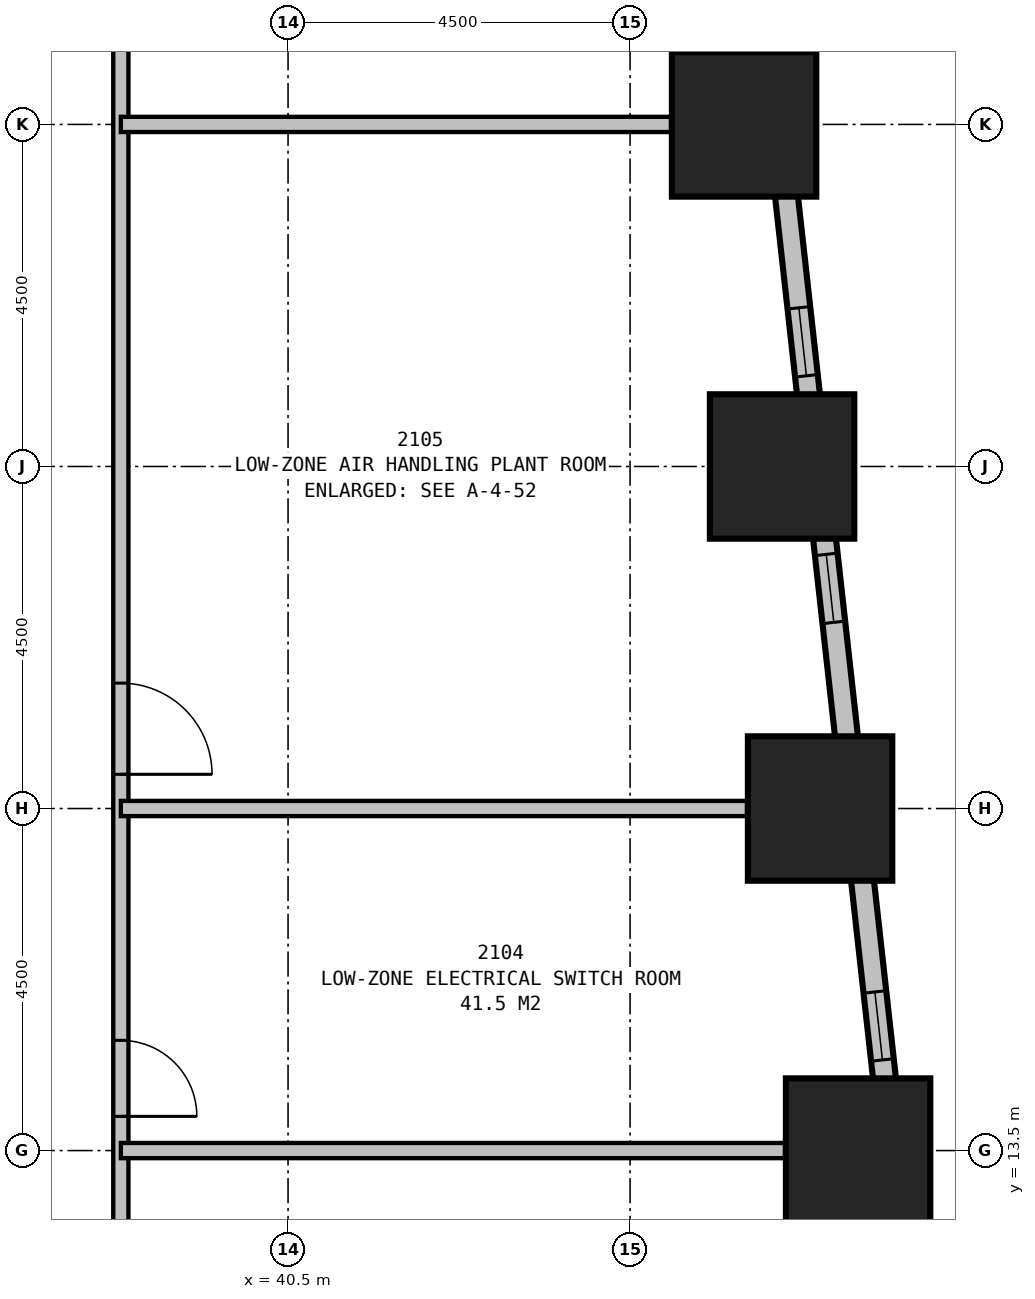
"""IFC4 building model, lengths in metres.
Left out: names, types, materials, properties, quantities, classifications, styles, units other than length and angle.
Written with IfcOpenShell. Run it as: python <this file> out.ifc"""

import sys

from ifc_helpers import new_model, si_unit, direction, frame, frame_2d, origin, origin_2d, place, context, subcontext, project, spatial, rectangle, extrude, element, fill, save


model = new_model("IFC4")
c1 = context("Model", 3, precision=1e-05, world=origin(), true_north=direction((0.0, 1.0)))
c2 = subcontext(c1, "Body", "Model", "MODEL_VIEW")
j1 = project(units=[si_unit("LENGTHUNIT", "METRE"), si_unit("PLANEANGLEUNIT", "RADIAN")], contexts=[c1])
p1 = place(None, origin())
s1 = spatial("IfcSite", under=j1, at=p1, CompositionType="ELEMENT")
p2 = place(p1, origin())
s2 = spatial("IfcBuilding", under=s1, at=p2, CompositionType="ELEMENT")
p3 = place(p2, frame((0.0, 0.0, 85.7)))
s3 = spatial("IfcBuildingStorey", under=s2, at=p3, CompositionType="ELEMENT", Elevation=85.7)
for number, where, z_axis, x_axis in (
    (1, (48.0, 13.5, 0.0), (0.0, 0.0, 1.0), (1.0, 0.0, 0.0)),
    (2, (47.5, 18.0, 0.0), (0.0, 0.0, 1.0), (1.0, 0.0, 0.0)),
    (3, (47.0, 22.5, 0.0), (0.0, 0.0, 1.0), (1.0, 0.0, 0.0)),
    (4, (46.5, 27.0, 0.0), (0.0, 0.0, 1.0), (1.0, 0.0, 0.0)),
):
    element("IfcColumn", number, at=place(p3, frame(where, z_axis=z_axis, x_axis=x_axis)), inside=s3, PredefinedType="COLUMN", context=c2, shape_type="SweptSolid", body=[
        extrude(rectangle(XDim=1.9, YDim=1.9, at=origin_2d()), origin(), (0.0, 0.0, 1.0), 4.2),
    ])
p4 = place(p3, frame((49.519, 3.901, 0.0), z_axis=(0.0, 0.0, 1.0), x_axis=(-0.110429082637, 0.993884006164, 0.0)))
e5 = element("IfcWall", 5, at=p4, inside=s3, PredefinedType="STANDARD", context=c2, shape_type="SweptSolid", body=[
    extrude(rectangle(XDim=32.899, YDim=0.3, at=frame_2d((16.45, 0.0))), origin(), (0.0, 0.0, 1.0), 2.85),
])
p5 = place(p4, frame((1.803, 0.0, 0.5)))
e6 = element("IfcOpeningElement", 6, at=p5, cuts=e5, PredefinedType="OPENING", context=c2, shape_type="SweptSolid", body=[
    extrude(rectangle(XDim=0.9, YDim=1.2, at=frame_2d((0.45, 0.6))), frame((0.0, 0.16, 0.0), z_axis=(0.0, -1.0, 0.0), x_axis=(1.0, 0.0, 0.0)), (0.0, 0.0, 1.0), 0.32),
])
p6 = place(p4, frame((7.595, 0.0, 0.5)))
e7 = element("IfcOpeningElement", 7, at=p6, cuts=e5, PredefinedType="OPENING", context=c2, shape_type="SweptSolid", body=[
    extrude(rectangle(XDim=0.9, YDim=1.2, at=frame_2d((0.45, 0.6))), frame((0.0, 0.16, 0.0), z_axis=(0.0, -1.0, 0.0), x_axis=(1.0, 0.0, 0.0)), (0.0, 0.0, 1.0), 0.32),
])
p7 = place(p4, frame((10.858, 0.0, 0.5)))
e8 = element("IfcOpeningElement", 8, at=p7, cuts=e5, PredefinedType="OPENING", context=c2, shape_type="SweptSolid", body=[
    extrude(rectangle(XDim=0.9, YDim=1.2, at=frame_2d((0.45, 0.6))), frame((0.0, 0.16, 0.0), z_axis=(0.0, -1.0, 0.0), x_axis=(1.0, 0.0, 0.0)), (0.0, 0.0, 1.0), 0.32),
])
p8 = place(p4, frame((16.65, 0.0, 0.5)))
e9 = element("IfcOpeningElement", 9, at=p8, cuts=e5, PredefinedType="OPENING", context=c2, shape_type="SweptSolid", body=[
    extrude(rectangle(XDim=0.9, YDim=1.2, at=frame_2d((0.45, 0.6))), frame((0.0, 0.16, 0.0), z_axis=(0.0, -1.0, 0.0), x_axis=(1.0, 0.0, 0.0)), (0.0, 0.0, 1.0), 0.32),
])
p9 = place(p4, frame((19.914, 0.0, 0.5)))
e10 = element("IfcOpeningElement", 10, at=p9, cuts=e5, PredefinedType="OPENING", context=c2, shape_type="SweptSolid", body=[
    extrude(rectangle(XDim=0.9, YDim=1.2, at=frame_2d((0.45, 0.6))), frame((0.0, 0.16, 0.0), z_axis=(0.0, -1.0, 0.0), x_axis=(1.0, 0.0, 0.0)), (0.0, 0.0, 1.0), 0.32),
])
p10 = place(p4, frame((25.705, 0.0, 0.5)))
e11 = element("IfcOpeningElement", 11, at=p10, cuts=e5, PredefinedType="OPENING", context=c2, shape_type="SweptSolid", body=[
    extrude(rectangle(XDim=0.9, YDim=1.2, at=frame_2d((0.45, 0.6))), frame((0.0, 0.16, 0.0), z_axis=(0.0, -1.0, 0.0), x_axis=(1.0, 0.0, 0.0)), (0.0, 0.0, 1.0), 0.32),
])
p11 = place(p4, frame((28.969, 0.0, 0.5)))
e12 = element("IfcOpeningElement", 12, at=p11, cuts=e5, PredefinedType="OPENING", context=c2, shape_type="SweptSolid", body=[
    extrude(rectangle(XDim=0.9, YDim=1.2, at=frame_2d((0.45, 0.6))), frame((0.0, 0.16, 0.0), z_axis=(0.0, -1.0, 0.0), x_axis=(1.0, 0.0, 0.0)), (0.0, 0.0, 1.0), 0.32),
])
p12 = place(p3, frame((38.3, 11.2, 0.0), z_axis=(0.0, 0.0, 1.0), x_axis=(0.0, 1.0, 0.0)))
e13 = element("IfcWall", 13, at=p12, inside=s3, PredefinedType="PARTITIONING", context=c2, shape_type="SweptSolid", body=[
    extrude(rectangle(XDim=18.1, YDim=0.2, at=frame_2d((9.05, 0.0))), origin(), (0.0, 0.0, 1.0), 3.95),
])
p13 = place(p12, frame((3.75, 0.0, 0.0), z_axis=(0.0, 0.0, 1.0), x_axis=(-1.0, 0.0, 0.0)))
e14 = element("IfcOpeningElement", 14, at=p13, cuts=e13, PredefinedType="OPENING", context=c2, shape_type="SweptSolid", body=[
    extrude(rectangle(XDim=1.0, YDim=2.1, at=frame_2d((0.5, 1.05))), frame((0.0, 0.11, 0.0), z_axis=(0.0, -1.0, 0.0), x_axis=(1.0, 0.0, 0.0)), (0.0, 0.0, 1.0), 0.22),
])
p14 = place(p12, frame((8.45, 0.0, 0.0), z_axis=(0.0, 0.0, 1.0), x_axis=(-1.0, 0.0, 0.0)))
e15 = element("IfcOpeningElement", 15, at=p14, cuts=e13, PredefinedType="OPENING", context=c2, shape_type="SweptSolid", body=[
    extrude(rectangle(XDim=1.2, YDim=2.1, at=frame_2d((0.6, 1.05))), frame((0.0, 0.11, 0.0), z_axis=(0.0, -1.0, 0.0), x_axis=(1.0, 0.0, 0.0)), (0.0, 0.0, 1.0), 0.22),
])
p15 = place(p3, frame((38.3, 13.5, 0.0), z_axis=(0.0, 0.0, 1.0), x_axis=(1.0, 0.0, 0.0)))
e16 = element("IfcWall", 16, at=p15, inside=s3, PredefinedType="PARTITIONING", context=c2, shape_type="SweptSolid", body=[
    extrude(rectangle(XDim=8.739, YDim=0.2, at=frame_2d((4.37, 0.0))), origin(), (0.0, 0.0, 1.0), 2.65),
])
p16 = place(p3, frame((38.3, 18.0, 0.0), z_axis=(0.0, 0.0, 1.0), x_axis=(1.0, 0.0, 0.0)))
e17 = element("IfcWall", 17, at=p16, inside=s3, PredefinedType="PARTITIONING", context=c2, shape_type="SweptSolid", body=[
    extrude(rectangle(XDim=8.239, YDim=0.2, at=frame_2d((4.12, 0.0))), origin(), (0.0, 0.0, 1.0), 2.95),
])
p17 = place(p3, frame((38.3, 27.0, 0.0), z_axis=(0.0, 0.0, 1.0), x_axis=(1.0, 0.0, 0.0)))
e18 = element("IfcWall", 18, at=p17, inside=s3, PredefinedType="PARTITIONING", context=c2, shape_type="SweptSolid", body=[
    extrude(rectangle(XDim=7.239, YDim=0.2, at=frame_2d((3.62, 0.0))), origin(), (0.0, 0.0, 1.0), 2.65),
])
p18 = place(p7, origin())
e19 = element("IfcWindow", 19, at=p18, inside=s3, PartitioningType="SINGLE_PANEL", PredefinedType="USERDEFINED", context=c2, shape_type="SweptSolid", body=[
    extrude(rectangle(XDim=0.9, YDim=1.2, at=frame_2d((0.45, 0.6))), frame((0.0, 0.03, 0.0), z_axis=(0.0, -1.0, 0.0), x_axis=(1.0, 0.0, 0.0)), (0.0, 0.0, 1.0), 0.06),
])
fill(e8, e19)
p19 = place(p8, origin())
e20 = element("IfcWindow", 20, at=p19, inside=s3, PartitioningType="SINGLE_PANEL", PredefinedType="USERDEFINED", context=c2, shape_type="SweptSolid", body=[
    extrude(rectangle(XDim=0.9, YDim=1.2, at=frame_2d((0.45, 0.6))), frame((0.0, 0.03, 0.0), z_axis=(0.0, -1.0, 0.0), x_axis=(1.0, 0.0, 0.0)), (0.0, 0.0, 1.0), 0.06),
])
fill(e9, e20)
p20 = place(p9, origin())
e21 = element("IfcWindow", 21, at=p20, inside=s3, PartitioningType="SINGLE_PANEL", PredefinedType="USERDEFINED", context=c2, shape_type="SweptSolid", body=[
    extrude(rectangle(XDim=0.9, YDim=1.2, at=frame_2d((0.45, 0.6))), frame((0.0, 0.03, 0.0), z_axis=(0.0, -1.0, 0.0), x_axis=(1.0, 0.0, 0.0)), (0.0, 0.0, 1.0), 0.06),
])
fill(e10, e21)
p21 = place(p13, origin())
e22 = element("IfcDoor", 22, at=p21, inside=s3, OperationType="SINGLE_SWING_RIGHT", PredefinedType="DOOR", context=c2, shape_type="SweptSolid", body=[
    extrude(rectangle(XDim=1.0, YDim=2.1, at=frame_2d((0.5, 1.05))), frame((0.0, 0.025, 0.0), z_axis=(0.0, -1.0, 0.0), x_axis=(1.0, 0.0, 0.0)), (0.0, 0.0, 1.0), 0.05),
])
fill(e14, e22)
p22 = place(p14, origin())
e23 = element("IfcDoor", 23, at=p22, inside=s3, OperationType="SINGLE_SWING_RIGHT", PredefinedType="DOOR", context=c2, shape_type="SweptSolid", body=[
    extrude(rectangle(XDim=1.2, YDim=2.1, at=frame_2d((0.6, 1.05))), frame((0.0, 0.025, 0.0), z_axis=(0.0, -1.0, 0.0), x_axis=(1.0, 0.0, 0.0)), (0.0, 0.0, 1.0), 0.05),
])
fill(e15, e23)
save(model, sys.argv[1])
